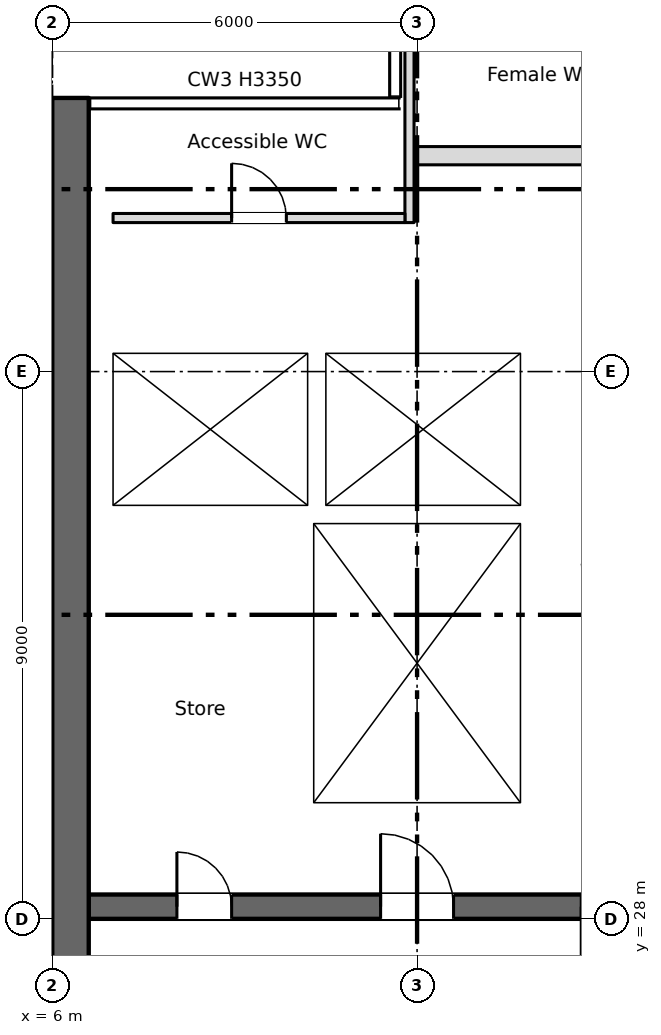
"""IFC4 building model, lengths in metres.
Left out: names, types, materials, properties, quantities, classifications, styles, units other than length and angle.
Written with IfcOpenShell. Run it as: python <this file> out.ifc"""

import sys

from ifc_helpers import new_model, si_unit, direction, frame, frame_2d, origin, place, context, subcontext, project, spatial, rectangle, extrude, element, fill, save


model = new_model("IFC4")
c1 = context("Model", 3, precision=1e-05, world=origin(), true_north=direction((0.0, 1.0)))
c2 = subcontext(c1, "Body", "Model", "MODEL_VIEW")
j1 = project(units=[si_unit("LENGTHUNIT", "METRE"), si_unit("PLANEANGLEUNIT", "RADIAN")], contexts=[c1])
p1 = place(None, origin())
s1 = spatial("IfcSite", under=j1, at=p1, CompositionType="ELEMENT")
p2 = place(p1, origin())
s2 = spatial("IfcBuilding", under=s1, at=p2, CompositionType="ELEMENT")
p3 = place(p2, frame((0.0, 0.0, 193.0)))
s3 = spatial("IfcBuildingStorey", under=s2, at=p3, CompositionType="ELEMENT", Elevation=193.0)
p4 = place(p3, frame((6.3, 7.5, 0.0), z_axis=(0.0, 0.0, 1.0), x_axis=(0.0, 1.0, 0.0)))
e1 = element("IfcWall", 1, at=p4, inside=s3, PredefinedType="SHEAR", context=c2, shape_type="SweptSolid", body=[
    extrude(rectangle(XDim=34.0, YDim=0.6, at=frame_2d((17.0, 0.0))), origin(), (0.0, 0.0, 1.0), 3.35),
])
p5 = place(p4, frame((1.2, 0.0, 0.6)))
e2 = element("IfcOpeningElement", 2, at=p5, cuts=e1, PredefinedType="OPENING", context=c2, shape_type="SweptSolid", body=[
    extrude(rectangle(XDim=0.6, YDim=2.4, at=frame_2d((0.3, 1.2))), frame((0.0, 0.31, 0.0), z_axis=(0.0, -1.0, 0.0), x_axis=(1.0, 0.0, 0.0)), (0.0, 0.0, 1.0), 0.62),
])
p6 = place(p4, frame((7.2, 0.0, 0.6)))
e3 = element("IfcOpeningElement", 3, at=p6, cuts=e1, PredefinedType="OPENING", context=c2, shape_type="SweptSolid", body=[
    extrude(rectangle(XDim=0.6, YDim=2.4, at=frame_2d((0.3, 1.2))), frame((0.0, 0.31, 0.0), z_axis=(0.0, -1.0, 0.0), x_axis=(1.0, 0.0, 0.0)), (0.0, 0.0, 1.0), 0.62),
])
p7 = place(p4, frame((13.2, 0.0, 0.6)))
e4 = element("IfcOpeningElement", 4, at=p7, cuts=e1, PredefinedType="OPENING", context=c2, shape_type="SweptSolid", body=[
    extrude(rectangle(XDim=0.6, YDim=2.4, at=frame_2d((0.3, 1.2))), frame((0.0, 0.31, 0.0), z_axis=(0.0, -1.0, 0.0), x_axis=(1.0, 0.0, 0.0)), (0.0, 0.0, 1.0), 0.62),
])
p8 = place(p4, frame((19.2, 0.0, 0.6)))
e5 = element("IfcOpeningElement", 5, at=p8, cuts=e1, PredefinedType="OPENING", context=c2, shape_type="SweptSolid", body=[
    extrude(rectangle(XDim=0.6, YDim=2.4, at=frame_2d((0.3, 1.2))), frame((0.0, 0.31, 0.0), z_axis=(0.0, -1.0, 0.0), x_axis=(1.0, 0.0, 0.0)), (0.0, 0.0, 1.0), 0.62),
])
p9 = place(p3, frame((6.6, 28.2, 0.0), z_axis=(0.0, 0.0, 1.0), x_axis=(1.0, 0.0, 0.0)))
e6 = element("IfcWall", 6, at=p9, inside=s3, PredefinedType="SHEAR", context=c2, shape_type="SweptSolid", body=[
    extrude(rectangle(XDim=57.9, YDim=0.4, at=frame_2d((28.95, 0.0))), origin(), (0.0, 0.0, 1.0), 3.35),
])
p10 = place(p9, frame((13.95, 0.0, 0.0)))
e7 = element("IfcOpeningElement", 7, at=p10, cuts=e6, PredefinedType="OPENING", context=c2, shape_type="SweptSolid", body=[
    extrude(rectangle(XDim=0.9, YDim=2.1, at=frame_2d((0.45, 1.05))), frame((0.0, 0.21, 0.0), z_axis=(0.0, -1.0, 0.0), x_axis=(1.0, 0.0, 0.0)), (0.0, 0.0, 1.0), 0.42),
])
p11 = place(p9, frame((48.663, 0.0, 0.0)))
e8 = element("IfcOpeningElement", 8, at=p11, cuts=e6, PredefinedType="OPENING", context=c2, shape_type="SweptSolid", body=[
    extrude(rectangle(XDim=0.9, YDim=2.1, at=frame_2d((0.45, 1.05))), frame((0.0, 0.21, 0.0), z_axis=(0.0, -1.0, 0.0), x_axis=(1.0, 0.0, 0.0)), (0.0, 0.0, 1.0), 0.42),
])
p12 = place(p9, frame((51.238, 0.0, 0.0)))
e9 = element("IfcOpeningElement", 9, at=p12, cuts=e6, PredefinedType="OPENING", context=c2, shape_type="SweptSolid", body=[
    extrude(rectangle(XDim=0.9, YDim=2.1, at=frame_2d((0.45, 1.05))), frame((0.0, 0.21, 0.0), z_axis=(0.0, -1.0, 0.0), x_axis=(1.0, 0.0, 0.0)), (0.0, 0.0, 1.0), 0.42),
])
p13 = place(p9, frame((1.45, 0.0, 0.0)))
e10 = element("IfcOpeningElement", 10, at=p13, cuts=e6, PredefinedType="OPENING", context=c2, shape_type="SweptSolid", body=[
    extrude(rectangle(XDim=0.9, YDim=2.1, at=frame_2d((0.45, 1.05))), frame((0.0, 0.21, 0.0), z_axis=(0.0, -1.0, 0.0), x_axis=(1.0, 0.0, 0.0)), (0.0, 0.0, 1.0), 0.42),
])
p14 = place(p9, frame((4.8, 0.0, 0.0)))
e11 = element("IfcOpeningElement", 11, at=p14, cuts=e6, PredefinedType="OPENING", context=c2, shape_type="SweptSolid", body=[
    extrude(rectangle(XDim=1.2, YDim=2.1, at=frame_2d((0.6, 1.05))), frame((0.0, 0.21, 0.0), z_axis=(0.0, -1.0, 0.0), x_axis=(1.0, 0.0, 0.0)), (0.0, 0.0, 1.0), 0.42),
])
p15 = place(p9, frame((31.8, 0.0, 0.0)))
e12 = element("IfcOpeningElement", 12, at=p15, cuts=e6, PredefinedType="OPENING", context=c2, shape_type="SweptSolid", body=[
    extrude(rectangle(XDim=1.2, YDim=2.1, at=frame_2d((0.6, 1.05))), frame((0.0, 0.21, 0.0), z_axis=(0.0, -1.0, 0.0), x_axis=(1.0, 0.0, 0.0)), (0.0, 0.0, 1.0), 0.42),
])
p16 = place(p9, frame((55.3, 0.0, 0.0)))
e13 = element("IfcOpeningElement", 13, at=p16, cuts=e6, PredefinedType="OPENING", context=c2, shape_type="SweptSolid", body=[
    extrude(rectangle(XDim=1.2, YDim=2.1, at=frame_2d((0.6, 1.05))), frame((0.0, 0.21, 0.0), z_axis=(0.0, -1.0, 0.0), x_axis=(1.0, 0.0, 0.0)), (0.0, 0.0, 1.0), 0.42),
])
p17 = place(p9, frame((21.8, 0.0, 0.0)))
e14 = element("IfcOpeningElement", 14, at=p17, cuts=e6, PredefinedType="OPENING", context=c2, shape_type="SweptSolid", body=[
    extrude(rectangle(XDim=1.2, YDim=2.1, at=frame_2d((0.6, 1.05))), frame((0.0, 0.21, 0.0), z_axis=(0.0, -1.0, 0.0), x_axis=(1.0, 0.0, 0.0)), (0.0, 0.0, 1.0), 0.42),
])
p18 = place(p9, frame((41.8, 0.0, 0.0)))
e15 = element("IfcOpeningElement", 15, at=p18, cuts=e6, PredefinedType="OPENING", context=c2, shape_type="SweptSolid", body=[
    extrude(rectangle(XDim=1.2, YDim=2.1, at=frame_2d((0.6, 1.05))), frame((0.0, 0.21, 0.0), z_axis=(0.0, -1.0, 0.0), x_axis=(1.0, 0.0, 0.0)), (0.0, 0.0, 1.0), 0.42),
])
p19 = place(p9, frame((24.95, 0.0, 0.0)))
e16 = element("IfcOpeningElement", 16, at=p19, cuts=e6, PredefinedType="OPENING", context=c2, shape_type="SweptSolid", body=[
    extrude(rectangle(XDim=2.4, YDim=2.1, at=frame_2d((1.2, 1.05))), frame((0.0, 0.21, 0.0), z_axis=(0.0, -1.0, 0.0), x_axis=(1.0, 0.0, 0.0)), (0.0, 0.0, 1.0), 0.42),
])
p20 = place(p9, frame((37.45, 0.0, 0.0)))
e17 = element("IfcOpeningElement", 17, at=p20, cuts=e6, PredefinedType="OPENING", context=c2, shape_type="SweptSolid", body=[
    extrude(rectangle(XDim=2.4, YDim=2.1, at=frame_2d((1.2, 1.05))), frame((0.0, 0.21, 0.0), z_axis=(0.0, -1.0, 0.0), x_axis=(1.0, 0.0, 0.0)), (0.0, 0.0, 1.0), 0.42),
])
p21 = place(p9, frame((8.1, 0.0, 0.0)))
e18 = element("IfcOpeningElement", 18, at=p21, cuts=e6, PredefinedType="OPENING", context=c2, shape_type="SweptSolid", body=[
    extrude(rectangle(XDim=2.4, YDim=2.1, at=frame_2d((1.2, 1.05))), frame((0.0, 0.21, 0.0), z_axis=(0.0, -1.0, 0.0), x_axis=(1.0, 0.0, 0.0)), (0.0, 0.0, 1.0), 0.42),
])
p22 = place(p9, frame((28.95, 0.0, 0.0)))
e19 = element("IfcOpeningElement", 19, at=p22, cuts=e6, PredefinedType="OPENING", context=c2, shape_type="SweptSolid", body=[
    extrude(rectangle(XDim=0.9, YDim=2.1, at=frame_2d((0.45, 1.05))), frame((0.0, 0.21, 0.0), z_axis=(0.0, -1.0, 0.0), x_axis=(1.0, 0.0, 0.0)), (0.0, 0.0, 1.0), 0.42),
])
p23 = place(p9, frame((34.95, 0.0, 0.0)))
e20 = element("IfcOpeningElement", 20, at=p23, cuts=e6, PredefinedType="OPENING", context=c2, shape_type="SweptSolid", body=[
    extrude(rectangle(XDim=0.9, YDim=2.1, at=frame_2d((0.45, 1.05))), frame((0.0, 0.21, 0.0), z_axis=(0.0, -1.0, 0.0), x_axis=(1.0, 0.0, 0.0)), (0.0, 0.0, 1.0), 0.42),
])
p24 = place(p3, frame((6.8, 28.4, 0.0), z_axis=(0.0, 0.0, 1.0), x_axis=(0.0, 1.0, 0.0)))
e21 = element("IfcWall", 21, at=p24, inside=s3, PredefinedType="SHEAR", context=c2, shape_type="SweptSolid", body=[
    extrude(rectangle(XDim=12.85, YDim=0.4, at=frame_2d((6.425, 0.0))), origin(), (0.0, 0.0, 1.0), 3.35),
])
for number, where, z_axis, x_axis in (
    (22, (10.15, 28.4, 0.0), (0.0, 0.0, 1.0), (0.0, 1.0, 0.0)),
    (23, (13.85, 28.4, 0.0), (0.0, 0.0, 1.0), (0.0, 1.0, 0.0)),
):
    element("IfcWall", number, at=place(p3, frame(where, z_axis=z_axis, x_axis=x_axis)), inside=s3, PredefinedType="SHEAR", context=c2, shape_type="SweptSolid", body=[
        extrude(rectangle(XDim=6.1, YDim=0.3, at=frame_2d((3.05, 0.0))), origin(), (0.0, 0.0, 1.0), 3.35),
    ])
for number, where, z_axis, x_axis in (
    (24, (7.0, 34.65, 0.0), (0.0, 0.0, 1.0), (1.0, 0.0, 0.0)),
    (25, (7.0, 37.45, 0.0), (0.0, 0.0, 1.0), (1.0, 0.0, 0.0)),
):
    element("IfcWall", number, at=place(p3, frame(where, z_axis=z_axis, x_axis=x_axis)), inside=s3, PredefinedType="SHEAR", context=c2, shape_type="SweptSolid", body=[
        extrude(rectangle(XDim=7.0, YDim=0.3, at=frame_2d((3.5, 0.0))), origin(), (0.0, 0.0, 1.0), 3.35),
    ])
p25 = place(p3, frame((13.85, 34.8, 0.0), z_axis=(0.0, 0.0, 1.0), x_axis=(0.0, 1.0, 0.0)))
e26 = element("IfcWall", 26, at=p25, inside=s3, PredefinedType="SHEAR", context=c2, shape_type="SweptSolid", body=[
    extrude(rectangle(XDim=2.5, YDim=0.3, at=frame_2d((1.25, 0.0))), origin(), (0.0, 0.0, 1.0), 3.35),
])
p26 = place(p3, frame((11.95, 40.55, 0.0), z_axis=(0.0, 0.0, 1.0), x_axis=(1.0, 0.0, 0.0)))
e27 = element("IfcWall", 27, at=p26, inside=s3, PredefinedType="PARTITIONING", context=c2, shape_type="SweptSolid", body=[
    extrude(rectangle(XDim=4.35, YDim=0.3, at=frame_2d((2.175, 0.0))), origin(), (0.0, 0.0, 1.0), 3.35),
])
p27 = place(p3, frame((10.35, 34.8, 0.0), z_axis=(0.0, 0.0, 1.0), x_axis=(0.0, 1.0, 0.0)))
e28 = element("IfcWall", 28, at=p27, inside=s3, PredefinedType="SHEAR", context=c2, shape_type="SweptSolid", body=[
    extrude(rectangle(XDim=2.5, YDim=0.3, at=frame_2d((1.25, 0.0))), origin(), (0.0, 0.0, 1.0), 3.35),
])
p28 = place(p3, frame((11.875, 39.45, 0.0), z_axis=(0.0, 0.0, 1.0), x_axis=(0.0, 1.0, 0.0)))
e29 = element("IfcWall", 29, at=p28, inside=s3, PredefinedType="PARTITIONING", context=c2, shape_type="SweptSolid", body=[
    extrude(rectangle(XDim=5.85, YDim=0.15, at=frame_2d((2.925, 0.0))), origin(), (0.0, 0.0, 1.0), 3.35),
])
p29 = place(p3, frame((7.0, 39.525, 0.0), z_axis=(0.0, 0.0, 1.0), x_axis=(1.0, 0.0, 0.0)))
e30 = element("IfcWall", 30, at=p29, inside=s3, PredefinedType="PARTITIONING", context=c2, shape_type="SweptSolid", body=[
    extrude(rectangle(XDim=4.8, YDim=0.15, at=frame_2d((2.4, 0.0))), origin(), (0.0, 0.0, 1.0), 3.35),
])
p30 = place(p29, frame((1.95, 0.0, 0.0)))
e31 = element("IfcOpeningElement", 31, at=p30, cuts=e30, PredefinedType="OPENING", context=c2, shape_type="SweptSolid", body=[
    extrude(rectangle(XDim=0.9, YDim=2.1, at=frame_2d((0.45, 1.05))), frame((0.0, 0.085, 0.0), z_axis=(0.0, -1.0, 0.0), x_axis=(1.0, 0.0, 0.0)), (0.0, 0.0, 1.0), 0.17),
])
p31 = place(p13, origin())
e32 = element("IfcDoor", 32, at=p31, inside=s3, OperationType="SINGLE_SWING_LEFT", PredefinedType="DOOR", context=c2, shape_type="SweptSolid", body=[
    extrude(rectangle(XDim=0.9, YDim=2.1, at=frame_2d((0.45, 1.05))), frame((0.0, 0.025, 0.0), z_axis=(0.0, -1.0, 0.0), x_axis=(1.0, 0.0, 0.0)), (0.0, 0.0, 1.0), 0.05),
])
fill(e10, e32)
p32 = place(p30, origin())
e33 = element("IfcDoor", 33, at=p32, inside=s3, OperationType="SINGLE_SWING_LEFT", PredefinedType="DOOR", context=c2, shape_type="SweptSolid", body=[
    extrude(rectangle(XDim=0.9, YDim=2.1, at=frame_2d((0.45, 1.05))), frame((0.0, 0.025, 0.0), z_axis=(0.0, -1.0, 0.0), x_axis=(1.0, 0.0, 0.0)), (0.0, 0.0, 1.0), 0.05),
])
fill(e31, e33)
p33 = place(p14, origin())
e34 = element("IfcDoor", 34, at=p33, inside=s3, OperationType="SINGLE_SWING_LEFT", PredefinedType="DOOR", context=c2, shape_type="SweptSolid", body=[
    extrude(rectangle(XDim=1.2, YDim=2.1, at=frame_2d((0.6, 1.05))), frame((0.0, 0.025, 0.0), z_axis=(0.0, -1.0, 0.0), x_axis=(1.0, 0.0, 0.0)), (0.0, 0.0, 1.0), 0.05),
])
fill(e11, e34)
save(model, sys.argv[1])
